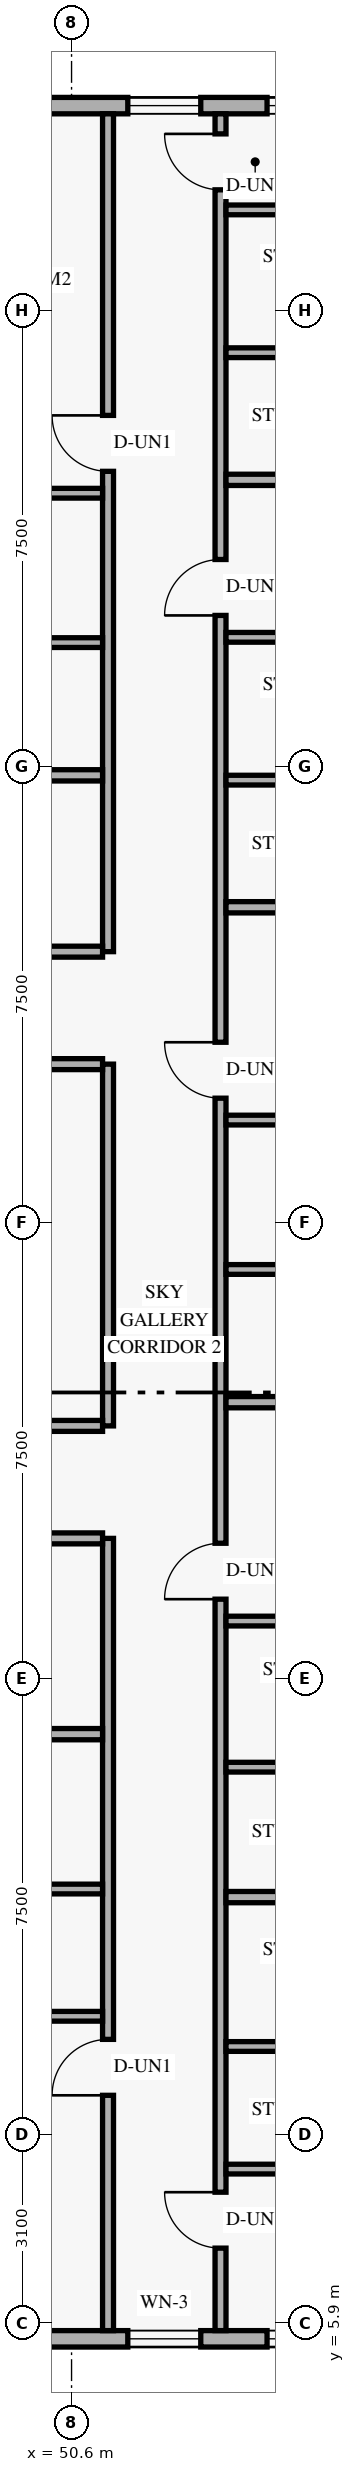
"""IFC4 building model, lengths in metres.
Left out: names, types, materials, properties, quantities, classifications, styles, units other than length and angle.
Written with IfcOpenShell. Run it as: python <this file> out.ifc"""

import sys

from ifc_helpers import new_model, si_unit, direction, frame, frame_2d, origin, place, context, subcontext, project, spatial, rectangle, extrude, element, fill, save


model = new_model("IFC4")
c1 = context("Model", 3, precision=1e-05, world=origin(), true_north=direction((0.0, 1.0)))
c2 = subcontext(c1, "Body", "Model", "MODEL_VIEW")
j1 = project(units=[si_unit("LENGTHUNIT", "METRE"), si_unit("PLANEANGLEUNIT", "RADIAN")], contexts=[c1])
p1 = place(None, origin())
s1 = spatial("IfcSite", under=j1, at=p1, CompositionType="ELEMENT")
p2 = place(p1, origin())
s2 = spatial("IfcBuilding", under=s1, at=p2, CompositionType="ELEMENT")
p3 = place(p2, frame((0.0, 0.0, 242.4)))
s3 = spatial("IfcBuildingStorey", under=s2, at=p3, CompositionType="ELEMENT", Elevation=242.4)
p4 = place(p3, frame((25.82, 5.635, 0.0), z_axis=(0.0, 0.0, 1.0), x_axis=(1.0, 0.0, 0.0)))
e1 = element("IfcWall", 1, at=p4, inside=s3, PredefinedType="SOLIDWALL", context=c2, shape_type="SweptSolid", body=[
    extrude(rectangle(XDim=32.96, YDim=0.27, at=frame_2d((16.48, 0.0))), origin(), (0.0, 0.0, 1.0), 3.36),
])
p5 = place(p4, frame((3.57, 0.0, 0.85)))
e2 = element("IfcOpeningElement", 2, at=p5, cuts=e1, PredefinedType="OPENING", context=c2, shape_type="SweptSolid", body=[
    extrude(rectangle(XDim=1.8, YDim=1.6, at=frame_2d((0.9, 0.8))), frame((0.0, 0.145, 0.0), z_axis=(0.0, -1.0, 0.0), x_axis=(1.0, 0.0, 0.0)), (0.0, 0.0, 1.0), 0.29),
])
p6 = place(p4, frame((16.076, 0.0, 0.85)))
e3 = element("IfcOpeningElement", 3, at=p6, cuts=e1, PredefinedType="OPENING", context=c2, shape_type="SweptSolid", body=[
    extrude(rectangle(XDim=1.8, YDim=1.6, at=frame_2d((0.9, 0.8))), frame((0.0, 0.145, 0.0), z_axis=(0.0, -1.0, 0.0), x_axis=(1.0, 0.0, 0.0)), (0.0, 0.0, 1.0), 0.29),
])
p7 = place(p4, frame((25.705, 0.0, 0.85)))
e4 = element("IfcOpeningElement", 4, at=p7, cuts=e1, PredefinedType="OPENING", context=c2, shape_type="SweptSolid", body=[
    extrude(rectangle(XDim=1.2, YDim=1.5, at=frame_2d((0.6, 0.75))), frame((0.0, 0.145, 0.0), z_axis=(0.0, -1.0, 0.0), x_axis=(1.0, 0.0, 0.0)), (0.0, 0.0, 1.0), 0.29),
])
p8 = place(p4, frame((27.995, 0.0, 0.85)))
e5 = element("IfcOpeningElement", 5, at=p8, cuts=e1, PredefinedType="OPENING", context=c2, shape_type="SweptSolid", body=[
    extrude(rectangle(XDim=1.8, YDim=1.6, at=frame_2d((0.9, 0.8))), frame((0.0, 0.145, 0.0), z_axis=(0.0, -1.0, 0.0), x_axis=(1.0, 0.0, 0.0)), (0.0, 0.0, 1.0), 0.29),
])
p9 = place(p3, frame((58.78, 42.365, 0.0), z_axis=(0.0, 0.0, 1.0), x_axis=(-1.0, 0.0, 0.0)))
e6 = element("IfcWall", 6, at=p9, inside=s3, PredefinedType="SOLIDWALL", context=c2, shape_type="SweptSolid", body=[
    extrude(rectangle(XDim=32.96, YDim=0.27, at=frame_2d((16.48, 0.0))), origin(), (0.0, 0.0, 1.0), 3.36),
])
p10 = place(p9, frame((17.735, 0.0, 0.85)))
e7 = element("IfcOpeningElement", 7, at=p10, cuts=e6, PredefinedType="OPENING", context=c2, shape_type="SweptSolid", body=[
    extrude(rectangle(XDim=1.8, YDim=1.6, at=frame_2d((0.9, 0.8))), frame((0.0, 0.145, 0.0), z_axis=(0.0, -1.0, 0.0), x_axis=(1.0, 0.0, 0.0)), (0.0, 0.0, 1.0), 0.29),
])
p11 = place(p9, frame((11.533, 0.0, 0.85)))
e8 = element("IfcOpeningElement", 8, at=p11, cuts=e6, PredefinedType="OPENING", context=c2, shape_type="SweptSolid", body=[
    extrude(rectangle(XDim=1.8, YDim=1.6, at=frame_2d((0.9, 0.8))), frame((0.0, 0.145, 0.0), z_axis=(0.0, -1.0, 0.0), x_axis=(1.0, 0.0, 0.0)), (0.0, 0.0, 1.0), 0.29),
])
p12 = place(p9, frame((6.055, 0.0, 0.85)))
e9 = element("IfcOpeningElement", 9, at=p12, cuts=e6, PredefinedType="OPENING", context=c2, shape_type="SweptSolid", body=[
    extrude(rectangle(XDim=1.2, YDim=1.5, at=frame_2d((0.6, 0.75))), frame((0.0, 0.145, 0.0), z_axis=(0.0, -1.0, 0.0), x_axis=(1.0, 0.0, 0.0)), (0.0, 0.0, 1.0), 0.29),
])
p13 = place(p9, frame((3.165, 0.0, 0.85)))
e10 = element("IfcOpeningElement", 10, at=p13, cuts=e6, PredefinedType="OPENING", context=c2, shape_type="SweptSolid", body=[
    extrude(rectangle(XDim=1.8, YDim=1.6, at=frame_2d((0.9, 0.8))), frame((0.0, 0.145, 0.0), z_axis=(0.0, -1.0, 0.0), x_axis=(1.0, 0.0, 0.0)), (0.0, 0.0, 1.0), 0.29),
])
p14 = place(p3, frame((51.2, 5.77, 0.0), z_axis=(0.0, 0.0, 1.0), x_axis=(0.0, 1.0, 0.0)))
e11 = element("IfcWall", 11, at=p14, inside=s3, PredefinedType="STANDARD", context=c2, shape_type="SweptSolid", body=[
    extrude(rectangle(XDim=13.03, YDim=0.18, at=frame_2d((6.515, 0.0))), origin(), (0.0, 0.0, 1.0), 2.803),
])
p15 = place(p14, frame((3.87, 0.0, 0.0)))
e12 = element("IfcOpeningElement", 12, at=p15, cuts=e11, PredefinedType="OPENING", context=c2, shape_type="SweptSolid", body=[
    extrude(rectangle(XDim=0.92, YDim=2.15, at=frame_2d((0.46, 1.075))), frame((0.0, 0.1, 0.0), z_axis=(0.0, -1.0, 0.0), x_axis=(1.0, 0.0, 0.0)), (0.0, 0.0, 1.0), 0.2),
])
p16 = place(p3, frame((51.2, 20.65, 0.0), z_axis=(0.0, 0.0, 1.0), x_axis=(0.0, 1.0, 0.0)))
e13 = element("IfcWall", 13, at=p16, inside=s3, PredefinedType="STANDARD", context=c2, shape_type="SweptSolid", body=[
    extrude(rectangle(XDim=5.95, YDim=0.18, at=frame_2d((2.975, 0.0))), origin(), (0.0, 0.0, 1.0), 3.36),
])
p17 = place(p3, frame((51.2, 28.45, 0.0), z_axis=(0.0, 0.0, 1.0), x_axis=(0.0, 1.0, 0.0)))
e14 = element("IfcWall", 14, at=p17, inside=s3, PredefinedType="STANDARD", context=c2, shape_type="SweptSolid", body=[
    extrude(rectangle(XDim=13.78, YDim=0.18, at=frame_2d((6.89, 0.0))), origin(), (0.0, 0.0, 1.0), 2.803),
])
p18 = place(p17, frame((7.9, 0.0, 0.0)))
e15 = element("IfcOpeningElement", 15, at=p18, cuts=e14, PredefinedType="OPENING", context=c2, shape_type="SweptSolid", body=[
    extrude(rectangle(XDim=0.92, YDim=2.15, at=frame_2d((0.46, 1.075))), frame((0.0, 0.1, 0.0), z_axis=(0.0, -1.0, 0.0), x_axis=(1.0, 0.0, 0.0)), (0.0, 0.0, 1.0), 0.2),
])
p19 = place(p3, frame((37.64, 18.8, 0.0), z_axis=(0.0, 0.0, 1.0), x_axis=(1.0, 0.0, 0.0)))
e16 = element("IfcWall", 16, at=p19, inside=s3, PredefinedType="STANDARD", context=c2, shape_type="SweptSolid", body=[
    extrude(rectangle(XDim=13.47, YDim=0.18, at=frame_2d((6.735, 0.0))), origin(), (0.0, 0.0, 1.0), 2.803),
])
p20 = place(p3, frame((37.64, 20.65, 0.0), z_axis=(0.0, 0.0, 1.0), x_axis=(1.0, 0.0, 0.0)))
e17 = element("IfcWall", 17, at=p20, inside=s3, PredefinedType="STANDARD", context=c2, shape_type="SweptSolid", body=[
    extrude(rectangle(XDim=13.47, YDim=0.18, at=frame_2d((6.735, 0.0))), origin(), (0.0, 0.0, 1.0), 2.803),
])
p21 = place(p20, frame((0.32, 0.0, 0.0)))
e18 = element("IfcOpeningElement", 18, at=p21, cuts=e17, PredefinedType="OPENING", context=c2, shape_type="SweptSolid", body=[
    extrude(rectangle(XDim=0.92, YDim=2.15, at=frame_2d((0.46, 1.075))), frame((0.0, 0.1, 0.0), z_axis=(0.0, -1.0, 0.0), x_axis=(1.0, 0.0, 0.0)), (0.0, 0.0, 1.0), 0.2),
])
for number, where, z_axis, x_axis in (
    (19, (37.64, 26.6, 0.0), (0.0, 0.0, 1.0), (1.0, 0.0, 0.0)),
    (20, (37.64, 28.45, 0.0), (0.0, 0.0, 1.0), (1.0, 0.0, 0.0)),
):
    element("IfcWall", number, at=place(p3, frame(where, z_axis=z_axis, x_axis=x_axis)), inside=s3, PredefinedType="STANDARD", context=c2, shape_type="SweptSolid", body=[
        extrude(rectangle(XDim=13.47, YDim=0.18, at=frame_2d((6.735, 0.0))), origin(), (0.0, 0.0, 1.0), 2.803),
    ])
p22 = place(p3, frame((53.05, 5.77, 0.0), z_axis=(0.0, 0.0, 1.0), x_axis=(0.0, 1.0, 0.0)))
e21 = element("IfcWall", 21, at=p22, inside=s3, PredefinedType="STANDARD", context=c2, shape_type="SweptSolid", body=[
    extrude(rectangle(XDim=36.46, YDim=0.18, at=frame_2d((18.23, 0.0))), origin(), (0.0, 0.0, 1.0), 2.803),
])
p23 = place(p22, frame((1.357, 0.0, 0.0)))
e22 = element("IfcOpeningElement", 22, at=p23, cuts=e21, PredefinedType="OPENING", context=c2, shape_type="SweptSolid", body=[
    extrude(rectangle(XDim=0.92, YDim=2.15, at=frame_2d((0.46, 1.075))), frame((0.0, 0.1, 0.0), z_axis=(0.0, -1.0, 0.0), x_axis=(1.0, 0.0, 0.0)), (0.0, 0.0, 1.0), 0.2),
])
p24 = place(p22, frame((12.03, 0.0, 0.0)))
e23 = element("IfcOpeningElement", 23, at=p24, cuts=e21, PredefinedType="OPENING", context=c2, shape_type="SweptSolid", body=[
    extrude(rectangle(XDim=0.92, YDim=2.15, at=frame_2d((0.46, 1.075))), frame((0.0, 0.1, 0.0), z_axis=(0.0, -1.0, 0.0), x_axis=(1.0, 0.0, 0.0)), (0.0, 0.0, 1.0), 0.2),
])
p25 = place(p22, frame((20.27, 0.0, 0.0)))
e24 = element("IfcOpeningElement", 24, at=p25, cuts=e21, PredefinedType="OPENING", context=c2, shape_type="SweptSolid", body=[
    extrude(rectangle(XDim=0.92, YDim=2.15, at=frame_2d((0.46, 1.075))), frame((0.0, 0.1, 0.0), z_axis=(0.0, -1.0, 0.0), x_axis=(1.0, 0.0, 0.0)), (0.0, 0.0, 1.0), 0.2),
])
p26 = place(p22, frame((28.21, 0.0, 0.0)))
e25 = element("IfcOpeningElement", 25, at=p26, cuts=e21, PredefinedType="OPENING", context=c2, shape_type="SweptSolid", body=[
    extrude(rectangle(XDim=0.92, YDim=2.15, at=frame_2d((0.46, 1.075))), frame((0.0, 0.1, 0.0), z_axis=(0.0, -1.0, 0.0), x_axis=(1.0, 0.0, 0.0)), (0.0, 0.0, 1.0), 0.2),
])
p27 = place(p22, frame((35.21, 0.0, 0.0)))
e26 = element("IfcOpeningElement", 26, at=p27, cuts=e21, PredefinedType="OPENING", context=c2, shape_type="SweptSolid", body=[
    extrude(rectangle(XDim=0.92, YDim=2.15, at=frame_2d((0.46, 1.075))), frame((0.0, 0.1, 0.0), z_axis=(0.0, -1.0, 0.0), x_axis=(1.0, 0.0, 0.0)), (0.0, 0.0, 1.0), 0.2),
])
p28 = place(p3, frame((53.14, 8.427, 0.0), z_axis=(0.0, 0.0, 1.0), x_axis=(1.0, 0.0, 0.0)))
e27 = element("IfcWall", 27, at=p28, inside=s3, PredefinedType="PLUMBINGWALL", context=c2, shape_type="SweptSolid", body=[
    extrude(rectangle(XDim=5.728, YDim=0.16, at=frame_2d((2.864, 0.0))), origin(), (0.0, 0.0, 1.0), 2.879),
])
p29 = place(p3, frame((53.14, 10.443, 0.0), z_axis=(0.0, 0.0, 1.0), x_axis=(1.0, 0.0, 0.0)))
e28 = element("IfcWall", 28, at=p29, inside=s3, PredefinedType="PLUMBINGWALL", context=c2, shape_type="SweptSolid", body=[
    extrude(rectangle(XDim=5.568, YDim=0.16, at=frame_2d((2.784, 0.0))), origin(), (0.0, 0.0, 1.0), 2.879),
])
p30 = place(p3, frame((53.14, 12.9, 0.0), z_axis=(0.0, 0.0, 1.0), x_axis=(1.0, 0.0, 0.0)))
e29 = element("IfcWall", 29, at=p30, inside=s3, PredefinedType="PARTITIONING", context=c2, shape_type="SweptSolid", body=[
    extrude(rectangle(XDim=8.99, YDim=0.185, at=frame_2d((4.495, 0.0))), origin(), (0.0, 0.0, 1.0), 2.879),
])
p31 = place(p3, frame((53.14, 17.44, 0.0), z_axis=(0.0, 0.0, 1.0), x_axis=(1.0, 0.0, 0.0)))
e30 = element("IfcWall", 30, at=p31, inside=s3, PredefinedType="PLUMBINGWALL", context=c2, shape_type="SweptSolid", body=[
    extrude(rectangle(XDim=5.728, YDim=0.16, at=frame_2d((2.864, 0.0))), origin(), (0.0, 0.0, 1.0), 2.803),
])
p32 = place(p3, frame((53.14, 15.037, 0.0), z_axis=(0.0, 0.0, 1.0), x_axis=(1.0, 0.0, 0.0)))
e31 = element("IfcWall", 31, at=p32, inside=s3, PredefinedType="PLUMBINGWALL", context=c2, shape_type="SweptSolid", body=[
    extrude(rectangle(XDim=5.568, YDim=0.16, at=frame_2d((2.784, 0.0))), origin(), (0.0, 0.0, 1.0), 2.879),
])
p33 = place(p3, frame((53.14, 21.04, 0.0), z_axis=(0.0, 0.0, 1.0), x_axis=(1.0, 0.0, 0.0)))
e32 = element("IfcWall", 32, at=p33, inside=s3, PredefinedType="PARTITIONING", context=c2, shape_type="SweptSolid", body=[
    extrude(rectangle(XDim=8.99, YDim=0.185, at=frame_2d((4.495, 0.0))), origin(), (0.0, 0.0, 1.0), 2.879),
])
p34 = place(p3, frame((53.14, 25.68, 0.0), z_axis=(0.0, 0.0, 1.0), x_axis=(1.0, 0.0, 0.0)))
e33 = element("IfcWall", 33, at=p34, inside=s3, PredefinedType="PLUMBINGWALL", context=c2, shape_type="SweptSolid", body=[
    extrude(rectangle(XDim=2.758, YDim=0.16, at=frame_2d((1.379, 0.0))), origin(), (0.0, 0.0, 1.0), 3.36),
])
p35 = place(p3, frame((53.14, 23.223, 0.0), z_axis=(0.0, 0.0, 1.0), x_axis=(1.0, 0.0, 0.0)))
e34 = element("IfcWall", 34, at=p35, inside=s3, PredefinedType="PLUMBINGWALL", context=c2, shape_type="SweptSolid", body=[
    extrude(rectangle(XDim=2.598, YDim=0.16, at=frame_2d((1.299, 0.0))), origin(), (0.0, 0.0, 1.0), 3.36),
])
p36 = place(p3, frame((53.14, 29.18, 0.0), z_axis=(0.0, 0.0, 1.0), x_axis=(1.0, 0.0, 0.0)))
e35 = element("IfcWall", 35, at=p36, inside=s3, PredefinedType="PARTITIONING", context=c2, shape_type="SweptSolid", body=[
    extrude(rectangle(XDim=8.99, YDim=0.185, at=frame_2d((4.495, 0.0))), origin(), (0.0, 0.0, 1.0), 2.879),
])
p37 = place(p3, frame((53.14, 33.62, 0.0), z_axis=(0.0, 0.0, 1.0), x_axis=(1.0, 0.0, 0.0)))
e36 = element("IfcWall", 36, at=p37, inside=s3, PredefinedType="PLUMBINGWALL", context=c2, shape_type="SweptSolid", body=[
    extrude(rectangle(XDim=5.728, YDim=0.16, at=frame_2d((2.864, 0.0))), origin(), (0.0, 0.0, 1.0), 2.879),
])
p38 = place(p3, frame((53.14, 31.271, 0.0), z_axis=(0.0, 0.0, 1.0), x_axis=(1.0, 0.0, 0.0)))
e37 = element("IfcWall", 37, at=p38, inside=s3, PredefinedType="PLUMBINGWALL", context=c2, shape_type="SweptSolid", body=[
    extrude(rectangle(XDim=5.568, YDim=0.16, at=frame_2d((2.784, 0.0))), origin(), (0.0, 0.0, 1.0), 2.879),
])
p39 = place(p3, frame((53.14, 36.21, 0.0), z_axis=(0.0, 0.0, 1.0), x_axis=(1.0, 0.0, 0.0)))
e38 = element("IfcWall", 38, at=p39, inside=s3, PredefinedType="PARTITIONING", context=c2, shape_type="SweptSolid", body=[
    extrude(rectangle(XDim=8.99, YDim=0.185, at=frame_2d((4.495, 0.0))), origin(), (0.0, 0.0, 1.0), 2.879),
])
p40 = place(p3, frame((53.14, 40.65, 0.0), z_axis=(0.0, 0.0, 1.0), x_axis=(1.0, 0.0, 0.0)))
e39 = element("IfcWall", 39, at=p40, inside=s3, PredefinedType="PLUMBINGWALL", context=c2, shape_type="SweptSolid", body=[
    extrude(rectangle(XDim=5.728, YDim=0.16, at=frame_2d((2.864, 0.0))), origin(), (0.0, 0.0, 1.0), 2.879),
])
p41 = place(p3, frame((53.14, 38.301, 0.0), z_axis=(0.0, 0.0, 1.0), x_axis=(1.0, 0.0, 0.0)))
e40 = element("IfcWall", 40, at=p41, inside=s3, PredefinedType="PLUMBINGWALL", context=c2, shape_type="SweptSolid", body=[
    extrude(rectangle(XDim=5.568, YDim=0.16, at=frame_2d((2.784, 0.0))), origin(), (0.0, 0.0, 1.0), 2.879),
])
p42 = place(p3, frame((37.64, 15.58, 0.0), z_axis=(0.0, 0.0, 1.0), x_axis=(1.0, 0.0, 0.0)))
e41 = element("IfcWall", 41, at=p42, inside=s3, PredefinedType="PARTITIONING", context=c2, shape_type="SweptSolid", body=[
    extrude(rectangle(XDim=13.47, YDim=0.185, at=frame_2d((6.735, 0.0))), origin(), (0.0, 0.0, 1.0), 2.803),
])
p43 = place(p3, frame((48.504, 10.94, 0.0), z_axis=(0.0, 0.0, 1.0), x_axis=(1.0, 0.0, 0.0)))
e42 = element("IfcWall", 42, at=p43, inside=s3, PredefinedType="PLUMBINGWALL", context=c2, shape_type="SweptSolid", body=[
    extrude(rectangle(XDim=2.606, YDim=0.16, at=frame_2d((1.303, 0.0))), origin(), (0.0, 0.0, 1.0), 2.803),
])
p44 = place(p3, frame((48.664, 13.033, 0.0), z_axis=(0.0, 0.0, 1.0), x_axis=(1.0, 0.0, 0.0)))
e43 = element("IfcWall", 43, at=p44, inside=s3, PredefinedType="PLUMBINGWALL", context=c2, shape_type="SweptSolid", body=[
    extrude(rectangle(XDim=2.446, YDim=0.16, at=frame_2d((1.223, 0.0))), origin(), (0.0, 0.0, 1.0), 3.36),
])
p45 = place(p3, frame((38.173, 31.35, 0.0), z_axis=(0.0, 0.0, 1.0), x_axis=(1.0, 0.0, 0.0)))
e44 = element("IfcWall", 44, at=p45, inside=s3, PredefinedType="PARTITIONING", context=c2, shape_type="SweptSolid", body=[
    extrude(rectangle(XDim=12.938, YDim=0.185, at=frame_2d((6.469, 0.0))), origin(), (0.0, 0.0, 1.0), 2.803),
])
p46 = place(p3, frame((48.428, 35.99, 0.0), z_axis=(0.0, 0.0, 1.0), x_axis=(1.0, 0.0, 0.0)))
e45 = element("IfcWall", 45, at=p46, inside=s3, PredefinedType="PLUMBINGWALL", context=c2, shape_type="SweptSolid", body=[
    extrude(rectangle(XDim=2.682, YDim=0.16, at=frame_2d((1.341, 0.0))), origin(), (0.0, 0.0, 1.0), 2.803),
])
p47 = place(p3, frame((48.588, 33.533, 0.0), z_axis=(0.0, 0.0, 1.0), x_axis=(1.0, 0.0, 0.0)))
e46 = element("IfcWall", 46, at=p47, inside=s3, PredefinedType="PLUMBINGWALL", context=c2, shape_type="SweptSolid", body=[
    extrude(rectangle(XDim=2.522, YDim=0.16, at=frame_2d((1.261, 0.0))), origin(), (0.0, 0.0, 1.0), 2.803),
])
p48 = place(p7, origin())
e47 = element("IfcWindow", 47, at=p48, inside=s3, PartitioningType="SINGLE_PANEL", PredefinedType="WINDOW", context=c2, shape_type="SweptSolid", body=[
    extrude(rectangle(XDim=1.2, YDim=1.5, at=frame_2d((0.6, 0.75))), frame((0.0, 0.03, 0.0), z_axis=(0.0, -1.0, 0.0), x_axis=(1.0, 0.0, 0.0)), (0.0, 0.0, 1.0), 0.06),
])
fill(e4, e47)
p49 = place(p8, origin())
e48 = element("IfcWindow", 48, at=p49, inside=s3, PartitioningType="SINGLE_PANEL", PredefinedType="WINDOW", context=c2, shape_type="SweptSolid", body=[
    extrude(rectangle(XDim=1.8, YDim=1.6, at=frame_2d((0.9, 0.8))), frame((0.0, 0.03, 0.0), z_axis=(0.0, -1.0, 0.0), x_axis=(1.0, 0.0, 0.0)), (0.0, 0.0, 1.0), 0.06),
])
fill(e5, e48)
p50 = place(p12, origin())
e49 = element("IfcWindow", 49, at=p50, inside=s3, PartitioningType="SINGLE_PANEL", PredefinedType="WINDOW", context=c2, shape_type="SweptSolid", body=[
    extrude(rectangle(XDim=1.2, YDim=1.5, at=frame_2d((0.6, 0.75))), frame((0.0, 0.03, 0.0), z_axis=(0.0, -1.0, 0.0), x_axis=(1.0, 0.0, 0.0)), (0.0, 0.0, 1.0), 0.06),
])
fill(e9, e49)
p51 = place(p13, origin())
e50 = element("IfcWindow", 50, at=p51, inside=s3, PartitioningType="SINGLE_PANEL", PredefinedType="WINDOW", context=c2, shape_type="SweptSolid", body=[
    extrude(rectangle(XDim=1.8, YDim=1.6, at=frame_2d((0.9, 0.8))), frame((0.0, 0.03, 0.0), z_axis=(0.0, -1.0, 0.0), x_axis=(1.0, 0.0, 0.0)), (0.0, 0.0, 1.0), 0.06),
])
fill(e10, e50)
p52 = place(p23, origin())
e51 = element("IfcDoor", 51, at=p52, inside=s3, OperationType="SINGLE_SWING_RIGHT", PredefinedType="DOOR", context=c2, shape_type="SweptSolid", body=[
    extrude(rectangle(XDim=0.92, YDim=2.15, at=frame_2d((0.46, 1.075))), frame((0.0, 0.025, 0.0), z_axis=(0.0, -1.0, 0.0), x_axis=(1.0, 0.0, 0.0)), (0.0, 0.0, 1.0), 0.05),
])
fill(e22, e51)
p53 = place(p24, origin())
e52 = element("IfcDoor", 52, at=p53, inside=s3, OperationType="SINGLE_SWING_LEFT", PredefinedType="DOOR", context=c2, shape_type="SweptSolid", body=[
    extrude(rectangle(XDim=0.92, YDim=2.15, at=frame_2d((0.46, 1.075))), frame((0.0, 0.025, 0.0), z_axis=(0.0, -1.0, 0.0), x_axis=(1.0, 0.0, 0.0)), (0.0, 0.0, 1.0), 0.05),
])
fill(e23, e52)
p54 = place(p25, origin())
e53 = element("IfcDoor", 53, at=p54, inside=s3, OperationType="SINGLE_SWING_RIGHT", PredefinedType="DOOR", context=c2, shape_type="SweptSolid", body=[
    extrude(rectangle(XDim=0.92, YDim=2.15, at=frame_2d((0.46, 1.075))), frame((0.0, 0.025, 0.0), z_axis=(0.0, -1.0, 0.0), x_axis=(1.0, 0.0, 0.0)), (0.0, 0.0, 1.0), 0.05),
])
fill(e24, e53)
p55 = place(p26, origin())
e54 = element("IfcDoor", 54, at=p55, inside=s3, OperationType="SINGLE_SWING_LEFT", PredefinedType="DOOR", context=c2, shape_type="SweptSolid", body=[
    extrude(rectangle(XDim=0.92, YDim=2.15, at=frame_2d((0.46, 1.075))), frame((0.0, 0.025, 0.0), z_axis=(0.0, -1.0, 0.0), x_axis=(1.0, 0.0, 0.0)), (0.0, 0.0, 1.0), 0.05),
])
fill(e25, e54)
p56 = place(p27, origin())
e55 = element("IfcDoor", 55, at=p56, inside=s3, OperationType="SINGLE_SWING_RIGHT", PredefinedType="DOOR", context=c2, shape_type="SweptSolid", body=[
    extrude(rectangle(XDim=0.92, YDim=2.15, at=frame_2d((0.46, 1.075))), frame((0.0, 0.025, 0.0), z_axis=(0.0, -1.0, 0.0), x_axis=(1.0, 0.0, 0.0)), (0.0, 0.0, 1.0), 0.05),
])
fill(e26, e55)
p57 = place(p15, origin())
e56 = element("IfcDoor", 56, at=p57, inside=s3, OperationType="SINGLE_SWING_LEFT", PredefinedType="DOOR", context=c2, shape_type="SweptSolid", body=[
    extrude(rectangle(XDim=0.92, YDim=2.15, at=frame_2d((0.46, 1.075))), frame((0.0, 0.025, 0.0), z_axis=(0.0, -1.0, 0.0), x_axis=(1.0, 0.0, 0.0)), (0.0, 0.0, 1.0), 0.05),
])
fill(e12, e56)
p58 = place(p18, origin())
e57 = element("IfcDoor", 57, at=p58, inside=s3, OperationType="SINGLE_SWING_RIGHT", PredefinedType="DOOR", context=c2, shape_type="SweptSolid", body=[
    extrude(rectangle(XDim=0.92, YDim=2.15, at=frame_2d((0.46, 1.075))), frame((0.0, 0.025, 0.0), z_axis=(0.0, -1.0, 0.0), x_axis=(1.0, 0.0, 0.0)), (0.0, 0.0, 1.0), 0.05),
])
fill(e15, e57)
save(model, sys.argv[1])
